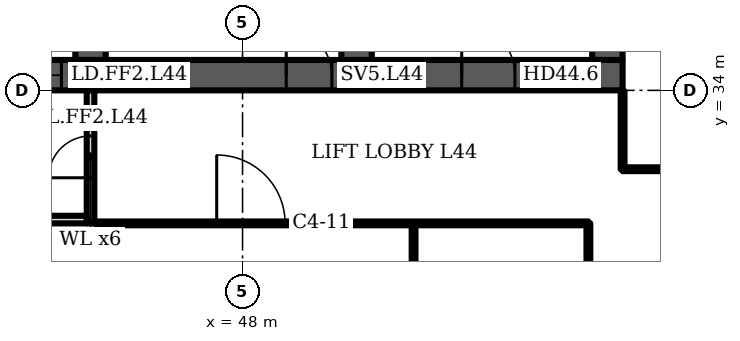
"""IFC4 building model, lengths in metres.
Left out: names, types, materials, properties, quantities, classifications, styles, units other than length and angle.
Written with IfcOpenShell. Run it as: python <this file> out.ifc"""

import sys

from ifc_helpers import new_model, si_unit, direction, frame, frame_2d, origin, place, context, subcontext, project, spatial, polyline, rectangle, outline, extrude, element, fill, save


model = new_model("IFC4")
c1 = context("Model", 3, precision=1e-05, world=origin(), true_north=direction((0.0, 1.0)))
c2 = subcontext(c1, "Body", "Model", "MODEL_VIEW")
j1 = project(units=[si_unit("LENGTHUNIT", "METRE"), si_unit("PLANEANGLEUNIT", "RADIAN")], contexts=[c1])
p1 = place(None, origin())
s1 = spatial("IfcSite", under=j1, at=p1, CompositionType="ELEMENT")
p2 = place(p1, origin())
s2 = spatial("IfcBuilding", under=s1, at=p2, CompositionType="ELEMENT")
p3 = place(p2, frame((0.0, 0.0, 180.7)))
s3 = spatial("IfcBuildingStorey", under=s2, at=p3, CompositionType="ELEMENT", Elevation=180.7)
p4 = place(p3, frame((16.0, 34.4, 0.0), z_axis=(0.0, 0.0, 1.0), x_axis=(1.0, 0.0, 0.0)))
e1 = element("IfcWall", 1, at=p4, inside=s3, PredefinedType="SHEAR", context=c2, shape_type="SweptSolid", body=[
    extrude(rectangle(XDim=42.0, YDim=0.8, at=frame_2d((21.0, 0.0))), origin(), (0.0, 0.0, 1.0), 3.6),
])
p5 = place(p4, frame((3.2, 0.0, 0.0)))
e2 = element("IfcOpeningElement", 2, at=p5, cuts=e1, PredefinedType="OPENING", context=c2, shape_type="SweptSolid", body=[
    extrude(rectangle(XDim=1.0, YDim=2.1, at=frame_2d((0.5, 1.05))), frame((0.0, 0.41, 0.0), z_axis=(0.0, -1.0, 0.0), x_axis=(1.0, 0.0, 0.0)), (0.0, 0.0, 1.0), 0.82),
])
p6 = place(p4, frame((7.65, 0.0, 0.0)))
e3 = element("IfcOpeningElement", 3, at=p6, cuts=e1, PredefinedType="OPENING", context=c2, shape_type="SweptSolid", body=[
    extrude(rectangle(XDim=1.2, YDim=2.1, at=frame_2d((0.6, 1.05))), frame((0.0, 0.41, 0.0), z_axis=(0.0, -1.0, 0.0), x_axis=(1.0, 0.0, 0.0)), (0.0, 0.0, 1.0), 0.82),
])
p7 = place(p4, frame((14.767, 0.0, 0.0)))
e4 = element("IfcOpeningElement", 4, at=p7, cuts=e1, PredefinedType="OPENING", context=c2, shape_type="SweptSolid", body=[
    extrude(rectangle(XDim=1.1, YDim=2.1, at=frame_2d((0.55, 1.05))), frame((0.0, 0.41, 0.0), z_axis=(0.0, -1.0, 0.0), x_axis=(1.0, 0.0, 0.0)), (0.0, 0.0, 1.0), 0.82),
])
p8 = place(p4, frame((19.133, 0.0, 0.0)))
e5 = element("IfcOpeningElement", 5, at=p8, cuts=e1, PredefinedType="OPENING", context=c2, shape_type="SweptSolid", body=[
    extrude(rectangle(XDim=1.1, YDim=2.1, at=frame_2d((0.55, 1.05))), frame((0.0, 0.41, 0.0), z_axis=(0.0, -1.0, 0.0), x_axis=(1.0, 0.0, 0.0)), (0.0, 0.0, 1.0), 0.82),
])
p9 = place(p4, frame((16.8, 0.0, 0.0)))
e6 = element("IfcOpeningElement", 6, at=p9, cuts=e1, PredefinedType="OPENING", context=c2, shape_type="SweptSolid", body=[
    extrude(rectangle(XDim=1.4, YDim=2.1, at=frame_2d((0.7, 1.05))), frame((0.0, 0.41, 0.0), z_axis=(0.0, -1.0, 0.0), x_axis=(1.0, 0.0, 0.0)), (0.0, 0.0, 1.0), 0.82),
])
p10 = place(p4, frame((21.767, 0.0, 0.0)))
e7 = element("IfcOpeningElement", 7, at=p10, cuts=e1, PredefinedType="OPENING", context=c2, shape_type="SweptSolid", body=[
    extrude(rectangle(XDim=1.1, YDim=2.1, at=frame_2d((0.55, 1.05))), frame((0.0, 0.41, 0.0), z_axis=(0.0, -1.0, 0.0), x_axis=(1.0, 0.0, 0.0)), (0.0, 0.0, 1.0), 0.82),
])
p11 = place(p4, frame((23.95, 0.0, 0.0)))
e8 = element("IfcOpeningElement", 8, at=p11, cuts=e1, PredefinedType="OPENING", context=c2, shape_type="SweptSolid", body=[
    extrude(rectangle(XDim=1.1, YDim=2.1, at=frame_2d((0.55, 1.05))), frame((0.0, 0.41, 0.0), z_axis=(0.0, -1.0, 0.0), x_axis=(1.0, 0.0, 0.0)), (0.0, 0.0, 1.0), 0.82),
])
p12 = place(p4, frame((26.133, 0.0, 0.0)))
e9 = element("IfcOpeningElement", 9, at=p12, cuts=e1, PredefinedType="OPENING", context=c2, shape_type="SweptSolid", body=[
    extrude(rectangle(XDim=1.1, YDim=2.1, at=frame_2d((0.55, 1.05))), frame((0.0, 0.41, 0.0), z_axis=(0.0, -1.0, 0.0), x_axis=(1.0, 0.0, 0.0)), (0.0, 0.0, 1.0), 0.82),
])
p13 = place(p4, frame((33.15, 0.0, 0.0)))
e10 = element("IfcOpeningElement", 10, at=p13, cuts=e1, PredefinedType="OPENING", context=c2, shape_type="SweptSolid", body=[
    extrude(rectangle(XDim=1.2, YDim=2.1, at=frame_2d((0.6, 1.05))), frame((0.0, 0.41, 0.0), z_axis=(0.0, -1.0, 0.0), x_axis=(1.0, 0.0, 0.0)), (0.0, 0.0, 1.0), 0.82),
])
p14 = place(p4, frame((37.767, 0.0, 0.0)))
e11 = element("IfcOpeningElement", 11, at=p14, cuts=e1, PredefinedType="OPENING", context=c2, shape_type="SweptSolid", body=[
    extrude(rectangle(XDim=1.4, YDim=2.1, at=frame_2d((0.7, 1.05))), frame((0.0, 0.41, 0.0), z_axis=(0.0, -1.0, 0.0), x_axis=(1.0, 0.0, 0.0)), (0.0, 0.0, 1.0), 0.82),
])
p15 = place(p3, frame((44.0, 34.8, 0.0), z_axis=(0.0, 0.0, 1.0), x_axis=(0.0, 1.0, 0.0)))
e12 = element("IfcWall", 12, at=p15, inside=s3, PredefinedType="SHEAR", context=c2, shape_type="SweptSolid", body=[
    extrude(rectangle(XDim=14.374, YDim=0.8, at=frame_2d((7.187, 0.0))), origin(), (0.0, 0.0, 1.0), 3.6),
])
p16 = place(p15, frame((11.312, 0.0, 0.0)))
e13 = element("IfcOpeningElement", 13, at=p16, cuts=e12, PredefinedType="OPENING", context=c2, shape_type="SweptSolid", body=[
    extrude(rectangle(XDim=1.0, YDim=2.1, at=frame_2d((0.5, 1.05))), frame((0.0, 0.41, 0.0), z_axis=(0.0, -1.0, 0.0), x_axis=(1.0, 0.0, 0.0)), (0.0, 0.0, 1.0), 0.82),
])
p17 = place(p15, frame((3.6, 0.0, 0.0)))
e14 = element("IfcOpeningElement", 14, at=p17, cuts=e12, PredefinedType="OPENING", context=c2, shape_type="SweptSolid", body=[
    extrude(rectangle(XDim=1.1, YDim=2.1, at=frame_2d((0.55, 1.05))), frame((0.0, 0.41, 0.0), z_axis=(0.0, -1.0, 0.0), x_axis=(1.0, 0.0, 0.0)), (0.0, 0.0, 1.0), 0.82),
])
p18 = place(p3, frame((51.0, 34.8, 0.0), z_axis=(0.0, 0.0, 1.0), x_axis=(0.0, 1.0, 0.0)))
e15 = element("IfcWall", 15, at=p18, inside=s3, PredefinedType="SHEAR", context=c2, shape_type="SweptSolid", body=[
    extrude(rectangle(XDim=13.762, YDim=0.8, at=frame_2d((6.881, 0.0))), origin(), (0.0, 0.0, 1.0), 3.6),
])
p19 = place(p18, frame((3.6, 0.0, 0.0)))
e16 = element("IfcOpeningElement", 16, at=p19, cuts=e15, PredefinedType="OPENING", context=c2, shape_type="SweptSolid", body=[
    extrude(rectangle(XDim=1.1, YDim=2.1, at=frame_2d((0.55, 1.05))), frame((0.0, 0.41, 0.0), z_axis=(0.0, -1.0, 0.0), x_axis=(1.0, 0.0, 0.0)), (0.0, 0.0, 1.0), 0.82),
])
p20 = place(p3, frame((57.6, 34.8, 0.0), z_axis=(0.0, 0.0, 1.0), x_axis=(0.0, 1.0, 0.0)))
e17 = element("IfcWall", 17, at=p20, inside=s3, PredefinedType="SHEAR", context=c2, shape_type="SweptSolid", body=[
    extrude(rectangle(XDim=13.184, YDim=0.8, at=frame_2d((6.592, 0.0))), origin(), (0.0, 0.0, 1.0), 3.6),
])
p21 = place(p3, frame((0.0, 0.0, -0.0)))
e18 = element("IfcWall", 18, at=p21, inside=s3, PredefinedType="PARTITIONING", context=c2, shape_type="SweptSolid", body=[
    extrude(outline(polyline([(41.567, 37.1), (39.433, 37.1), (39.433, 34.8), (39.233, 34.8), (39.233, 37.65), (37.4, 37.65), (37.4, 37.85), (39.233, 37.85), (39.433, 37.85), (39.433, 37.3), (41.567, 37.3), (41.567, 37.55), (41.767, 37.55), (43.6, 37.55), (43.6, 37.35), (41.767, 37.35), (41.767, 34.8), (41.567, 34.8), (41.567, 37.1)])), origin(), (0.0, 0.0, 1.0), 3.2),
])
p22 = place(p3, frame((44.0, 30.5, 0.0), z_axis=(0.0, 0.0, 1.0), x_axis=(0.0, 1.0, 0.0)))
e19 = element("IfcWall", 19, at=p22, inside=s3, PredefinedType="PARTITIONING", context=c2, shape_type="SweptSolid", body=[
    extrude(rectangle(XDim=3.5, YDim=0.2, at=frame_2d((1.75, 0.0))), origin(), (0.0, 0.0, 1.0), 3.2),
])
p23 = place(p22, frame((1.2, 0.0, 0.0)))
e20 = element("IfcOpeningElement", 20, at=p23, cuts=e19, PredefinedType="OPENING", context=c2, shape_type="SweptSolid", body=[
    extrude(rectangle(XDim=1.1, YDim=2.1, at=frame_2d((0.55, 1.05))), frame((0.0, 0.11, 0.0), z_axis=(0.0, -1.0, 0.0), x_axis=(1.0, 0.0, 0.0)), (0.0, 0.0, 1.0), 0.22),
])
p24 = place(p3, frame((41.1, 30.6, 0.0), z_axis=(0.0, 0.0, 1.0), x_axis=(1.0, 0.0, 0.0)))
e21 = element("IfcWall", 21, at=p24, inside=s3, PredefinedType="PARTITIONING", context=c2, shape_type="SweptSolid", body=[
    extrude(rectangle(XDim=2.8, YDim=0.2, at=frame_2d((1.4, 0.0))), origin(), (0.0, 0.0, 1.0), 3.2),
])
p25 = place(p3, frame((52.5, 1.98, 0.0), z_axis=(0.0, 0.0, 1.0), x_axis=(0.0, 1.0, 0.0)))
e22 = element("IfcWall", 22, at=p25, inside=s3, PredefinedType="PARTITIONING", context=c2, shape_type="SweptSolid", body=[
    extrude(rectangle(XDim=28.52, YDim=0.1, at=frame_2d((14.26, 0.0))), origin(), (0.0, 0.0, 1.0), 3.2),
])
p26 = place(p3, frame((57.1, 11.985, 0.0), z_axis=(0.0, 0.0, 1.0), x_axis=(0.0, 1.0, 0.0)))
e23 = element("IfcWall", 23, at=p26, inside=s3, PredefinedType="PARTITIONING", context=c2, shape_type="SweptSolid", body=[
    extrude(rectangle(XDim=18.515, YDim=0.1, at=frame_2d((9.257, 0.0))), origin(), (0.0, 0.0, 1.0), 3.2),
])
p27 = place(p26, frame((8.295, 0.0, 0.0)))
e24 = element("IfcOpeningElement", 24, at=p27, cuts=e23, PredefinedType="OPENING", context=c2, shape_type="SweptSolid", body=[
    extrude(rectangle(XDim=1.8, YDim=2.1, at=frame_2d((0.9, 1.05))), frame((0.0, 0.06, 0.0), z_axis=(0.0, -1.0, 0.0), x_axis=(1.0, 0.0, 0.0)), (0.0, 0.0, 1.0), 0.12),
])
p28 = place(p3, frame((58.0, 31.925, 0.0), z_axis=(0.0, 0.0, 1.0), x_axis=(0.0, 1.0, 0.0)))
e25 = element("IfcWall", 25, at=p28, inside=s3, PredefinedType="PARTITIONING", context=c2, shape_type="SweptSolid", body=[
    extrude(rectangle(XDim=2.055, YDim=0.1, at=frame_2d((1.027, 0.0))), origin(), (0.0, 0.0, 1.0), 3.2),
])
p29 = place(p3, frame((58.0, 31.925, 0.0), z_axis=(0.0, 0.0, 1.0), x_axis=(1.0, 0.0, 0.0)))
e26 = element("IfcWall", 26, at=p29, inside=s3, PredefinedType="PARTITIONING", context=c2, shape_type="SweptSolid", body=[
    extrude(rectangle(XDim=1.425, YDim=0.1, at=frame_2d((0.712, 0.0))), origin(), (0.0, 0.0, 1.0), 3.2),
])
p30 = place(p3, frame((58.9, 27.435, 0.0), z_axis=(0.0, 0.0, 1.0), x_axis=(0.178584, 0.983924, 0.0)))
e27 = element("IfcWall", 27, at=p30, inside=s3, PredefinedType="PARTITIONING", context=c2, shape_type="SweptSolid", body=[
    extrude(rectangle(XDim=2.353, YDim=0.1, at=frame_2d((1.176, 0.0))), origin(), (0.0, 0.0, 1.0), 3.2),
])
p31 = place(p3, frame((44.15, 30.5, 0.0), z_axis=(0.0, 0.0, 1.0), x_axis=(1.0, 0.0, 0.0)))
e28 = element("IfcWall", 28, at=p31, inside=s3, PredefinedType="PARTITIONING", context=c2, shape_type="SweptSolid", body=[
    extrude(rectangle(XDim=12.95, YDim=0.1, at=frame_2d((6.475, 0.0))), origin(), (0.0, 0.0, 1.0), 3.2),
])
p32 = place(p31, frame((3.17, 0.0, 0.0)))
e29 = element("IfcOpeningElement", 29, at=p32, cuts=e28, PredefinedType="OPENING", context=c2, shape_type="SweptSolid", body=[
    extrude(rectangle(XDim=1.8, YDim=2.1, at=frame_2d((0.9, 1.05))), frame((0.0, 0.06, 0.0), z_axis=(0.0, -1.0, 0.0), x_axis=(1.0, 0.0, 0.0)), (0.0, 0.0, 1.0), 0.12),
])
p33 = place(p12, origin())
e30 = element("IfcDoor", 30, at=p33, inside=s3, OperationType="DOUBLE_DOOR_SLIDING", PredefinedType="DOOR", context=c2, shape_type="SweptSolid", body=[
    extrude(rectangle(XDim=1.1, YDim=2.1, at=frame_2d((0.55, 1.05))), frame((0.0, 0.025, 0.0), z_axis=(0.0, -1.0, 0.0), x_axis=(1.0, 0.0, 0.0)), (0.0, 0.0, 1.0), 0.05),
])
fill(e9, e30)
p34 = place(p13, origin())
e31 = element("IfcDoor", 31, at=p34, inside=s3, OperationType="SINGLE_SWING_LEFT", PredefinedType="DOOR", context=c2, shape_type="SweptSolid", body=[
    extrude(rectangle(XDim=1.2, YDim=2.1, at=frame_2d((0.6, 1.05))), frame((0.0, 0.025, 0.0), z_axis=(0.0, -1.0, 0.0), x_axis=(1.0, 0.0, 0.0)), (0.0, 0.0, 1.0), 0.05),
])
fill(e10, e31)
p35 = place(p14, origin())
e32 = element("IfcDoor", 32, at=p35, inside=s3, OperationType="DOUBLE_DOOR_SINGLE_SWING", PredefinedType="DOOR", context=c2, shape_type="SweptSolid", body=[
    extrude(rectangle(XDim=1.4, YDim=2.1, at=frame_2d((0.7, 1.05))), frame((0.0, 0.025, 0.0), z_axis=(0.0, -1.0, 0.0), x_axis=(1.0, 0.0, 0.0)), (0.0, 0.0, 1.0), 0.05),
])
fill(e11, e32)
p36 = place(p23, origin())
e33 = element("IfcDoor", 33, at=p36, inside=s3, OperationType="SINGLE_SWING_LEFT", PredefinedType="DOOR", context=c2, shape_type="SweptSolid", body=[
    extrude(rectangle(XDim=1.1, YDim=2.1, at=frame_2d((0.55, 1.05))), frame((0.0, 0.025, 0.0), z_axis=(0.0, -1.0, 0.0), x_axis=(1.0, 0.0, 0.0)), (0.0, 0.0, 1.0), 0.05),
])
fill(e20, e33)
p37 = place(p32, origin())
e34 = element("IfcDoor", 34, at=p37, inside=s3, OperationType="DOUBLE_DOOR_SINGLE_SWING", PredefinedType="DOOR", context=c2, shape_type="SweptSolid", body=[
    extrude(rectangle(XDim=1.8, YDim=2.1, at=frame_2d((0.9, 1.05))), frame((0.0, 0.025, 0.0), z_axis=(0.0, -1.0, 0.0), x_axis=(1.0, 0.0, 0.0)), (0.0, 0.0, 1.0), 0.05),
])
fill(e29, e34)
save(model, sys.argv[1])
